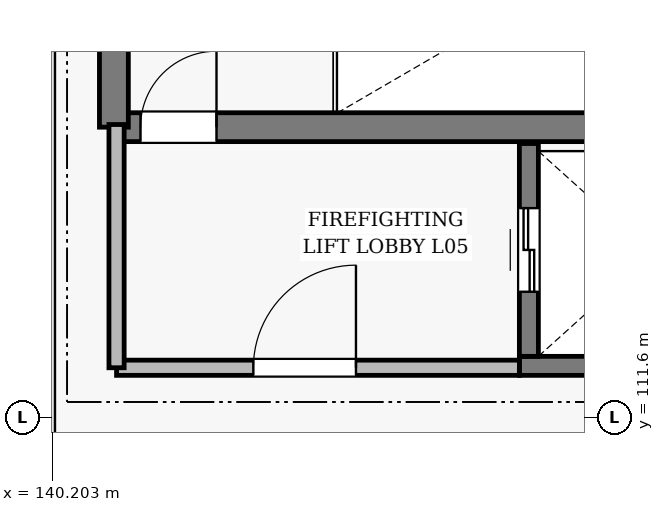
"""IFC4 building model, lengths in metres.
Left out: names, types, materials, properties, quantities, classifications, styles, units other than length and angle.
Written with IfcOpenShell. Run it as: python <this file> out.ifc"""

import sys

from ifc_helpers import new_model, si_unit, direction, frame, frame_2d, origin, place, context, subcontext, project, spatial, rectangle, extrude, element, fill, save


model = new_model("IFC4")
c1 = context("Model", 3, precision=1e-05, world=origin(), true_north=direction((0.0, 1.0)))
c2 = subcontext(c1, "Body", "Model", "MODEL_VIEW")
j1 = project(units=[si_unit("LENGTHUNIT", "METRE"), si_unit("PLANEANGLEUNIT", "RADIAN")], contexts=[c1])
p1 = place(None, origin())
s1 = spatial("IfcSite", under=j1, at=p1, CompositionType="ELEMENT")
p2 = place(p1, origin())
s2 = spatial("IfcBuilding", under=s1, at=p2, CompositionType="ELEMENT")
p3 = place(p2, frame((0.0, 0.0, 25.2)))
s3 = spatial("IfcBuildingStorey", under=s2, at=p3, CompositionType="ELEMENT", Elevation=25.2)
p4 = place(p3, frame((141.015, 115.415, 0.0), z_axis=(0.0, 0.0, 1.0), x_axis=(1.0, 0.0, 0.0)))
e1 = element("IfcWall", 1, at=p4, inside=s3, PredefinedType="SOLIDWALL", context=c2, shape_type="SweptSolid", body=[
    extrude(rectangle(XDim=10.17, YDim=0.38, at=frame_2d((5.085, 0.0))), origin(), (0.0, 0.0, 1.0), 5.2),
])
p5 = place(p4, frame((0.35, 0.0, 0.005)))
e2 = element("IfcOpeningElement", 2, at=p5, cuts=e1, PredefinedType="OPENING", context=c2, shape_type="SweptSolid", body=[
    extrude(rectangle(XDim=1.0, YDim=2.15, at=frame_2d((0.5, 1.075))), frame((0.0, 0.202, 0.0), z_axis=(0.0, -1.0, 0.0), x_axis=(1.0, 0.0, 0.0)), (0.0, 0.0, 1.0), 0.404),
])
p6 = place(p3, frame((141.015, 115.415, 0.0), z_axis=(0.0, 0.0, 1.0), x_axis=(0.0, 1.0, 0.0)))
e3 = element("IfcWall", 3, at=p6, inside=s3, PredefinedType="SOLIDWALL", context=c2, shape_type="SweptSolid", body=[
    extrude(rectangle(XDim=4.47, YDim=0.38, at=frame_2d((2.235, 0.0))), origin(), (0.0, 0.0, 1.0), 5.2),
])
p7 = place(p3, frame((146.35, 112.275, 0.0), z_axis=(0.0, 0.0, 1.0), x_axis=(1.0, 0.0, 0.0)))
e4 = element("IfcWall", 4, at=p7, inside=s3, PredefinedType="SOLIDWALL", context=c2, shape_type="SweptSolid", body=[
    extrude(rectangle(XDim=3.5, YDim=0.25, at=frame_2d((1.75, 0.0))), origin(), (0.0, 0.0, 1.0), 5.2),
])
p8 = place(p3, frame((146.475, 112.4, 0.0), z_axis=(0.0, 0.0, 1.0), x_axis=(0.0, 1.0, 0.0)))
e5 = element("IfcWall", 5, at=p8, inside=s3, PredefinedType="SOLIDWALL", context=c2, shape_type="SweptSolid", body=[
    extrude(rectangle(XDim=2.8, YDim=0.25, at=frame_2d((1.4, 0.0))), origin(), (0.0, 0.0, 1.0), 5.2),
])
p9 = place(p8, frame((0.85, 0.0, 0.005)))
e6 = element("IfcOpeningElement", 6, at=p9, cuts=e5, PredefinedType="OPENING", context=c2, shape_type="SweptSolid", body=[
    extrude(rectangle(XDim=1.1, YDim=2.15, at=frame_2d((0.55, 1.075))), frame((0.0, 0.137, 0.0), z_axis=(0.0, -1.0, 0.0), x_axis=(1.0, 0.0, 0.0)), (0.0, 0.0, 1.0), 0.274),
])
p10 = place(p3, frame((141.05, 112.25, 0.0), z_axis=(0.0, 0.0, 1.0), x_axis=(1.0, 0.0, 0.0)))
e7 = element("IfcWall", 7, at=p10, inside=s3, PredefinedType="PARTITIONING", context=c2, shape_type="SweptSolid", body=[
    extrude(rectangle(XDim=5.3, YDim=0.2, at=frame_2d((2.65, 0.0))), origin(), (0.0, 0.0, 1.0), 5.05),
])
p11 = place(p10, frame((1.8, 0.0, 0.005)))
e8 = element("IfcOpeningElement", 8, at=p11, cuts=e7, PredefinedType="OPENING", context=c2, shape_type="SweptSolid", body=[
    extrude(rectangle(XDim=1.35, YDim=2.15, at=frame_2d((0.675, 1.075))), frame((0.0, 0.112, 0.0), z_axis=(0.0, -1.0, 0.0), x_axis=(1.0, 0.0, 0.0)), (0.0, 0.0, 1.0), 0.224),
])
p12 = place(p3, frame((141.05, 112.25, 0.0), z_axis=(0.0, 0.0, 1.0), x_axis=(0.0, 1.0, 0.0)))
e9 = element("IfcWall", 9, at=p12, inside=s3, PredefinedType="PARTITIONING", context=c2, shape_type="SweptSolid", body=[
    extrude(rectangle(XDim=3.2, YDim=0.2, at=frame_2d((1.6, 0.0))), origin(), (0.0, 0.0, 1.0), 5.05),
])
p13 = place(p5, origin())
e10 = element("IfcDoor", 10, at=p13, inside=s3, OperationType="SINGLE_SWING_RIGHT", PredefinedType="DOOR", context=c2, shape_type="SweptSolid", body=[
    extrude(rectangle(XDim=1.0, YDim=2.15, at=frame_2d((0.5, 1.075))), frame((0.0, 0.025, 0.0), z_axis=(0.0, -1.0, 0.0), x_axis=(1.0, 0.0, 0.0)), (0.0, 0.0, 1.0), 0.05),
])
fill(e2, e10)
p14 = place(p9, origin())
e11 = element("IfcDoor", 11, at=p14, inside=s3, OperationType="SLIDING_TO_LEFT", PredefinedType="DOOR", context=c2, shape_type="SweptSolid", body=[
    extrude(rectangle(XDim=1.1, YDim=2.15, at=frame_2d((0.55, 1.075))), frame((0.0, 0.025, 0.0), z_axis=(0.0, -1.0, 0.0), x_axis=(1.0, 0.0, 0.0)), (0.0, 0.0, 1.0), 0.05),
])
fill(e6, e11)
p15 = place(p11, origin())
e12 = element("IfcDoor", 12, at=p15, inside=s3, OperationType="SINGLE_SWING_RIGHT", PredefinedType="DOOR", context=c2, shape_type="SweptSolid", body=[
    extrude(rectangle(XDim=1.35, YDim=2.15, at=frame_2d((0.675, 1.075))), frame((0.0, 0.025, 0.0), z_axis=(0.0, -1.0, 0.0), x_axis=(1.0, 0.0, 0.0)), (0.0, 0.0, 1.0), 0.05),
])
fill(e8, e12)
save(model, sys.argv[1])
